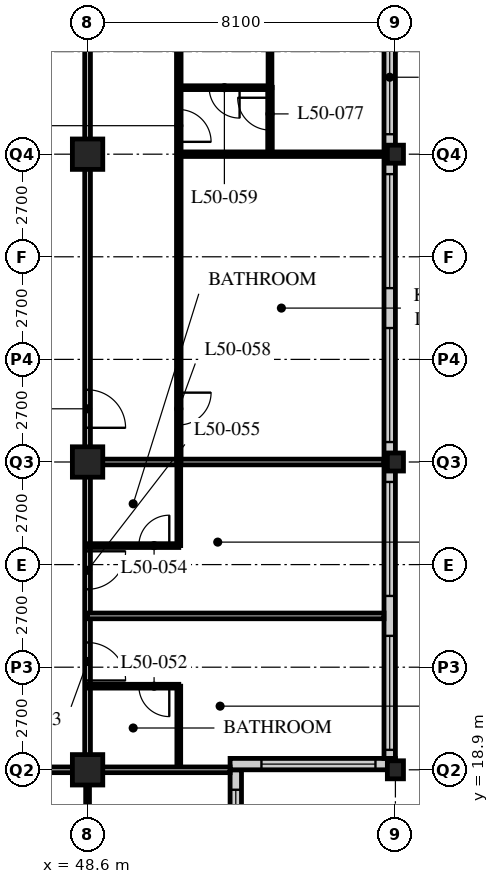
"""IFC4 building model, lengths in metres.
Left out: names, types, materials, properties, quantities, classifications, styles, units other than length and angle.
Written with IfcOpenShell. Run it as: python <this file> out.ifc"""

import sys

from ifc_helpers import new_model, si_unit, direction, frame, frame_2d, origin, origin_2d, place, context, subcontext, project, spatial, rectangle, hollow_rectangle, i_section, extrude, element, fill, save


model = new_model("IFC4")
c1 = context("Model", 3, precision=1e-05, world=origin(), true_north=direction((0.0, 1.0)))
c2 = subcontext(c1, "Body", "Model", "MODEL_VIEW")
j1 = project(units=[si_unit("LENGTHUNIT", "METRE"), si_unit("PLANEANGLEUNIT", "RADIAN")], contexts=[c1])
p1 = place(None, origin())
s1 = spatial("IfcSite", under=j1, at=p1, CompositionType="ELEMENT")
p2 = place(p1, origin())
s2 = spatial("IfcBuilding", under=s1, at=p2, CompositionType="ELEMENT")
p3 = place(p2, frame((0.0, 0.0, 195.6)))
s3 = spatial("IfcBuildingStorey", under=s2, at=p3, CompositionType="ELEMENT", Elevation=195.6)
for number, where, z_axis, x_axis in (
    (1, (48.6, 18.9, 0.0), (0.0, 0.0, 1.0), (1.0, 0.0, 0.0)),
    (2, (48.6, 27.0, 0.0), (0.0, 0.0, 1.0), (1.0, 0.0, 0.0)),
    (3, (48.6, 35.1, 0.0), (0.0, 0.0, 1.0), (1.0, 0.0, 0.0)),
):
    element("IfcColumn", number, at=place(p3, frame(where, z_axis=z_axis, x_axis=x_axis)), inside=s3, PredefinedType="COLUMN", context=c2, shape_type="SweptSolid", body=[
        extrude(hollow_rectangle(XDim=0.8, YDim=0.8, WallThickness=0.08, at=origin_2d()), origin(), (0.0, 0.0, 1.0), 3.6),
    ])
for number, where, z_axis, x_axis in (
    (4, (56.7, 18.9, 0.0), (0.0, 0.0, 1.0), (1.0, 0.0, 0.0)),
    (5, (56.7, 27.0, 0.0), (0.0, 0.0, 1.0), (1.0, 0.0, 0.0)),
    (6, (56.7, 35.1, 0.0), (0.0, 0.0, 1.0), (1.0, 0.0, 0.0)),
):
    element("IfcColumn", number, at=place(p3, frame(where, z_axis=z_axis, x_axis=x_axis)), inside=s3, PredefinedType="COLUMN", context=c2, shape_type="SweptSolid", body=[
        extrude(i_section(OverallWidth=0.424, OverallDepth=0.475, WebThickness=0.048, FlangeThickness=0.077, FilletRadius=0.015, at=origin_2d()), origin(), (0.0, 0.0, 1.0), 3.6),
    ])
p4 = place(p3, frame((52.5, 15.15, 0.0), z_axis=(0.0, 0.0, 1.0), x_axis=(0.0, 1.0, 0.0)))
e7 = element("IfcWall", 7, at=p4, inside=s3, PredefinedType="SOLIDWALL", context=c2, shape_type="SweptSolid", body=[
    extrude(rectangle(XDim=3.75, YDim=0.3, at=frame_2d((1.875, 0.0))), origin(), (0.0, 0.0, 1.0), 3.39),
])
p5 = place(p4, frame((0.225, 0.0, 0.6)))
e8 = element("IfcOpeningElement", 8, at=p5, cuts=e7, PredefinedType="OPENING", context=c2, shape_type="SweptSolid", body=[
    extrude(rectangle(XDim=3.0, YDim=2.0, at=frame_2d((1.5, 1.0))), frame((0.0, 0.16, 0.0), z_axis=(0.0, -1.0, 0.0), x_axis=(1.0, 0.0, 0.0)), (0.0, 0.0, 1.0), 0.32),
])
p6 = place(p3, frame((52.35, 19.05, 0.0), z_axis=(0.0, 0.0, 1.0), x_axis=(1.0, 0.0, 0.0)))
e9 = element("IfcWall", 9, at=p6, inside=s3, PredefinedType="SOLIDWALL", context=c2, shape_type="SweptSolid", body=[
    extrude(rectangle(XDim=4.35, YDim=0.3, at=frame_2d((2.175, 0.0))), origin(), (0.0, 0.0, 1.0), 3.39),
])
p7 = place(p6, frame((0.825, 0.0, 0.6)))
e10 = element("IfcOpeningElement", 10, at=p7, cuts=e9, PredefinedType="OPENING", context=c2, shape_type="SweptSolid", body=[
    extrude(rectangle(XDim=3.0, YDim=2.0, at=frame_2d((1.5, 1.0))), frame((0.0, 0.16, 0.0), z_axis=(0.0, -1.0, 0.0), x_axis=(1.0, 0.0, 0.0)), (0.0, 0.0, 1.0), 0.32),
])
p8 = place(p3, frame((56.55, 19.2, 0.0), z_axis=(0.0, 0.0, 1.0), x_axis=(0.0, 1.0, 0.0)))
e11 = element("IfcWall", 11, at=p8, inside=s3, PredefinedType="SOLIDWALL", context=c2, shape_type="SweptSolid", body=[
    extrude(rectangle(XDim=32.1, YDim=0.3, at=frame_2d((16.05, 0.0))), origin(), (0.0, 0.0, 1.0), 3.39),
])
p9 = place(p8, frame((0.225, 0.0, 0.6)))
e12 = element("IfcOpeningElement", 12, at=p9, cuts=e11, PredefinedType="OPENING", context=c2, shape_type="SweptSolid", body=[
    extrude(rectangle(XDim=3.0, YDim=2.4, at=frame_2d((1.5, 1.2))), frame((0.0, 0.16, 0.0), z_axis=(0.0, -1.0, 0.0), x_axis=(1.0, 0.0, 0.0)), (0.0, 0.0, 1.0), 0.32),
])
p10 = place(p8, frame((4.275, 0.0, 0.6)))
e13 = element("IfcOpeningElement", 13, at=p10, cuts=e11, PredefinedType="OPENING", context=c2, shape_type="SweptSolid", body=[
    extrude(rectangle(XDim=3.0, YDim=2.4, at=frame_2d((1.5, 1.2))), frame((0.0, 0.16, 0.0), z_axis=(0.0, -1.0, 0.0), x_axis=(1.0, 0.0, 0.0)), (0.0, 0.0, 1.0), 0.32),
])
p11 = place(p8, frame((8.325, 0.0, 0.6)))
e14 = element("IfcOpeningElement", 14, at=p11, cuts=e11, PredefinedType="OPENING", context=c2, shape_type="SweptSolid", body=[
    extrude(rectangle(XDim=3.0, YDim=2.4, at=frame_2d((1.5, 1.2))), frame((0.0, 0.16, 0.0), z_axis=(0.0, -1.0, 0.0), x_axis=(1.0, 0.0, 0.0)), (0.0, 0.0, 1.0), 0.32),
])
p12 = place(p8, frame((12.375, 0.0, 0.6)))
e15 = element("IfcOpeningElement", 15, at=p12, cuts=e11, PredefinedType="OPENING", context=c2, shape_type="SweptSolid", body=[
    extrude(rectangle(XDim=3.0, YDim=2.4, at=frame_2d((1.5, 1.2))), frame((0.0, 0.16, 0.0), z_axis=(0.0, -1.0, 0.0), x_axis=(1.0, 0.0, 0.0)), (0.0, 0.0, 1.0), 0.32),
])
p13 = place(p8, frame((16.425, 0.0, 0.6)))
e16 = element("IfcOpeningElement", 16, at=p13, cuts=e11, PredefinedType="OPENING", context=c2, shape_type="SweptSolid", body=[
    extrude(rectangle(XDim=3.0, YDim=2.4, at=frame_2d((1.5, 1.2))), frame((0.0, 0.16, 0.0), z_axis=(0.0, -1.0, 0.0), x_axis=(1.0, 0.0, 0.0)), (0.0, 0.0, 1.0), 0.32),
])
p14 = place(p8, frame((20.475, 0.0, 0.6)))
e17 = element("IfcOpeningElement", 17, at=p14, cuts=e11, PredefinedType="OPENING", context=c2, shape_type="SweptSolid", body=[
    extrude(rectangle(XDim=3.0, YDim=2.4, at=frame_2d((1.5, 1.2))), frame((0.0, 0.16, 0.0), z_axis=(0.0, -1.0, 0.0), x_axis=(1.0, 0.0, 0.0)), (0.0, 0.0, 1.0), 0.32),
])
p15 = place(p8, frame((24.525, 0.0, 0.6)))
e18 = element("IfcOpeningElement", 18, at=p15, cuts=e11, PredefinedType="OPENING", context=c2, shape_type="SweptSolid", body=[
    extrude(rectangle(XDim=3.0, YDim=2.4, at=frame_2d((1.5, 1.2))), frame((0.0, 0.16, 0.0), z_axis=(0.0, -1.0, 0.0), x_axis=(1.0, 0.0, 0.0)), (0.0, 0.0, 1.0), 0.32),
])
p16 = place(p8, frame((28.575, 0.0, 0.6)))
e19 = element("IfcOpeningElement", 19, at=p16, cuts=e11, PredefinedType="OPENING", context=c2, shape_type="SweptSolid", body=[
    extrude(rectangle(XDim=3.0, YDim=2.4, at=frame_2d((1.5, 1.2))), frame((0.0, 0.16, 0.0), z_axis=(0.0, -1.0, 0.0), x_axis=(1.0, 0.0, 0.0)), (0.0, 0.0, 1.0), 0.32),
])
p17 = place(p3, frame((8.1, 18.9, 0.0), z_axis=(0.0, 0.0, 1.0), x_axis=(1.0, 0.0, 0.0)))
e20 = element("IfcWall", 20, at=p17, inside=s3, PredefinedType="PARTITIONING", context=c2, shape_type="SweptSolid", body=[
    extrude(rectangle(XDim=40.5, YDim=0.15, at=frame_2d((20.25, 0.0))), origin(), (0.0, 0.0, 1.0), 2.778),
])
p18 = place(p17, frame((4.45, 0.0, 0.0)))
e21 = element("IfcOpeningElement", 21, at=p18, cuts=e20, PredefinedType="OPENING", context=c2, shape_type="SweptSolid", body=[
    extrude(rectangle(XDim=1.0, YDim=2.1, at=frame_2d((0.5, 1.05))), frame((0.0, 0.085, 0.0), z_axis=(0.0, -1.0, 0.0), x_axis=(1.0, 0.0, 0.0)), (0.0, 0.0, 1.0), 0.17),
])
p19 = place(p17, frame((17.1, 0.0, 0.0)))
e22 = element("IfcOpeningElement", 22, at=p19, cuts=e20, PredefinedType="OPENING", context=c2, shape_type="SweptSolid", body=[
    extrude(rectangle(XDim=1.0, YDim=2.1, at=frame_2d((0.5, 1.05))), frame((0.0, 0.085, 0.0), z_axis=(0.0, -1.0, 0.0), x_axis=(1.0, 0.0, 0.0)), (0.0, 0.0, 1.0), 0.17),
])
p20 = place(p17, frame((28.75, 0.0, 0.0)))
e23 = element("IfcOpeningElement", 23, at=p20, cuts=e20, PredefinedType="OPENING", context=c2, shape_type="SweptSolid", body=[
    extrude(rectangle(XDim=1.0, YDim=2.1, at=frame_2d((0.5, 1.05))), frame((0.0, 0.085, 0.0), z_axis=(0.0, -1.0, 0.0), x_axis=(1.0, 0.0, 0.0)), (0.0, 0.0, 1.0), 0.17),
])
p21 = place(p17, frame((2.625, 0.0, 0.0)))
e24 = element("IfcOpeningElement", 24, at=p21, cuts=e20, PredefinedType="OPENING", context=c2, shape_type="SweptSolid", body=[
    extrude(rectangle(XDim=1.0, YDim=2.1, at=frame_2d((0.5, 1.05))), frame((0.0, 0.085, 0.0), z_axis=(0.0, -1.0, 0.0), x_axis=(1.0, 0.0, 0.0)), (0.0, 0.0, 1.0), 0.17),
])
p22 = place(p17, frame((36.875, 0.0, 0.0)))
e25 = element("IfcOpeningElement", 25, at=p22, cuts=e20, PredefinedType="OPENING", context=c2, shape_type="SweptSolid", body=[
    extrude(rectangle(XDim=1.0, YDim=2.1, at=frame_2d((0.5, 1.05))), frame((0.0, 0.085, 0.0), z_axis=(0.0, -1.0, 0.0), x_axis=(1.0, 0.0, 0.0)), (0.0, 0.0, 1.0), 0.17),
])
p23 = place(p3, frame((48.6, 18.9, 0.0), z_axis=(0.0, 0.0, 1.0), x_axis=(0.0, 1.0, 0.0)))
e26 = element("IfcWall", 26, at=p23, inside=s3, PredefinedType="PARTITIONING", context=c2, shape_type="SweptSolid", body=[
    extrude(rectangle(XDim=24.3, YDim=0.15, at=frame_2d((12.15, 0.0))), origin(), (0.0, 0.0, 1.0), 2.778),
])
p24 = place(p23, frame((2.35, 0.0, 0.0)))
e27 = element("IfcOpeningElement", 27, at=p24, cuts=e26, PredefinedType="OPENING", context=c2, shape_type="SweptSolid", body=[
    extrude(rectangle(XDim=1.0, YDim=2.1, at=frame_2d((0.5, 1.05))), frame((0.0, 0.085, 0.0), z_axis=(0.0, -1.0, 0.0), x_axis=(1.0, 0.0, 0.0)), (0.0, 0.0, 1.0), 0.17),
])
p25 = place(p23, frame((4.75, 0.0, 0.0)))
e28 = element("IfcOpeningElement", 28, at=p25, cuts=e26, PredefinedType="OPENING", context=c2, shape_type="SweptSolid", body=[
    extrude(rectangle(XDim=1.0, YDim=2.1, at=frame_2d((0.5, 1.05))), frame((0.0, 0.085, 0.0), z_axis=(0.0, -1.0, 0.0), x_axis=(1.0, 0.0, 0.0)), (0.0, 0.0, 1.0), 0.17),
])
p26 = place(p23, frame((9.0, 0.0, 0.0)))
e29 = element("IfcOpeningElement", 29, at=p26, cuts=e26, PredefinedType="OPENING", context=c2, shape_type="SweptSolid", body=[
    extrude(rectangle(XDim=1.0, YDim=2.1, at=frame_2d((0.5, 1.05))), frame((0.0, 0.085, 0.0), z_axis=(0.0, -1.0, 0.0), x_axis=(1.0, 0.0, 0.0)), (0.0, 0.0, 1.0), 0.17),
])
p27 = place(p3, frame((51.0, 18.9, 0.0), z_axis=(0.0, 0.0, 1.0), x_axis=(0.0, 1.0, 0.0)))
e30 = element("IfcWall", 30, at=p27, inside=s3, PredefinedType="PARTITIONING", context=c2, shape_type="SweptSolid", body=[
    extrude(rectangle(XDim=2.2, YDim=0.1, at=frame_2d((1.1, 0.0))), origin(), (0.0, 0.0, 1.0), 3.39),
])
p28 = place(p3, frame((48.6, 21.1, 0.0), z_axis=(0.0, 0.0, 1.0), x_axis=(1.0, 0.0, 0.0)))
e31 = element("IfcWall", 31, at=p28, inside=s3, PredefinedType="PARTITIONING", context=c2, shape_type="SweptSolid", body=[
    extrude(rectangle(XDim=2.4, YDim=0.1, at=frame_2d((1.2, 0.0))), origin(), (0.0, 0.0, 1.0), 3.39),
])
p29 = place(p28, frame((1.35, 0.0, 0.0)))
e32 = element("IfcOpeningElement", 32, at=p29, cuts=e31, PredefinedType="OPENING", context=c2, shape_type="SweptSolid", body=[
    extrude(rectangle(XDim=0.8, YDim=2.1, at=frame_2d((0.4, 1.05))), frame((0.0, 0.06, 0.0), z_axis=(0.0, -1.0, 0.0), x_axis=(1.0, 0.0, 0.0)), (0.0, 0.0, 1.0), 0.12),
])
p30 = place(p3, frame((48.6, 22.95, 0.0), z_axis=(0.0, 0.0, 1.0), x_axis=(1.0, 0.0, 0.0)))
e33 = element("IfcWall", 33, at=p30, inside=s3, PredefinedType="PARTITIONING", context=c2, shape_type="SweptSolid", body=[
    extrude(rectangle(XDim=7.8, YDim=0.15, at=frame_2d((3.9, 0.0))), origin(), (0.0, 0.0, 1.0), 3.39),
])
p31 = place(p3, frame((51.0, 24.8, 0.0), z_axis=(0.0, 0.0, 1.0), x_axis=(0.0, 1.0, 0.0)))
e34 = element("IfcWall", 34, at=p31, inside=s3, PredefinedType="PARTITIONING", context=c2, shape_type="SweptSolid", body=[
    extrude(rectangle(XDim=2.2, YDim=0.1, at=frame_2d((1.1, 0.0))), origin(), (0.0, 0.0, 1.0), 3.39),
])
p32 = place(p3, frame((48.6, 24.8, 0.0), z_axis=(0.0, 0.0, 1.0), x_axis=(1.0, 0.0, 0.0)))
e35 = element("IfcWall", 35, at=p32, inside=s3, PredefinedType="PARTITIONING", context=c2, shape_type="SweptSolid", body=[
    extrude(rectangle(XDim=2.4, YDim=0.1, at=frame_2d((1.2, 0.0))), origin(), (0.0, 0.0, 1.0), 3.39),
])
p33 = place(p32, frame((1.35, 0.0, 0.0)))
e36 = element("IfcOpeningElement", 36, at=p33, cuts=e35, PredefinedType="OPENING", context=c2, shape_type="SweptSolid", body=[
    extrude(rectangle(XDim=0.8, YDim=2.1, at=frame_2d((0.4, 1.05))), frame((0.0, 0.06, 0.0), z_axis=(0.0, -1.0, 0.0), x_axis=(1.0, 0.0, 0.0)), (0.0, 0.0, 1.0), 0.12),
])
p34 = place(p3, frame((48.6, 27.0, 0.0), z_axis=(0.0, 0.0, 1.0), x_axis=(1.0, 0.0, 0.0)))
e37 = element("IfcWall", 37, at=p34, inside=s3, PredefinedType="PARTITIONING", context=c2, shape_type="SweptSolid", body=[
    extrude(rectangle(XDim=7.8, YDim=0.15, at=frame_2d((3.9, 0.0))), origin(), (0.0, 0.0, 1.0), 2.778),
])
p35 = place(p3, frame((51.0, 27.0, 0.0), z_axis=(0.0, 0.0, 1.0), x_axis=(0.0, 1.0, 0.0)))
e38 = element("IfcWall", 38, at=p35, inside=s3, PredefinedType="PARTITIONING", context=c2, shape_type="SweptSolid", body=[
    extrude(rectangle(XDim=16.2, YDim=0.12, at=frame_2d((8.1, 0.0))), origin(), (0.0, 0.0, 1.0), 3.39),
])
p36 = place(p35, frame((0.975, 0.0, 0.0)))
e39 = element("IfcOpeningElement", 39, at=p36, cuts=e38, PredefinedType="OPENING", context=c2, shape_type="SweptSolid", body=[
    extrude(rectangle(XDim=0.85, YDim=2.1, at=frame_2d((0.425, 1.05))), frame((0.0, 0.07, 0.0), z_axis=(0.0, -1.0, 0.0), x_axis=(1.0, 0.0, 0.0)), (0.0, 0.0, 1.0), 0.14),
])
p37 = place(p35, frame((8.425, 0.0, 0.0)))
e40 = element("IfcOpeningElement", 40, at=p37, cuts=e38, PredefinedType="OPENING", context=c2, shape_type="SweptSolid", body=[
    extrude(rectangle(XDim=0.85, YDim=2.1, at=frame_2d((0.425, 1.05))), frame((0.0, 0.07, 0.0), z_axis=(0.0, -1.0, 0.0), x_axis=(1.0, 0.0, 0.0)), (0.0, 0.0, 1.0), 0.14),
])
p38 = place(p35, frame((12.475, 0.0, 0.0)))
e41 = element("IfcOpeningElement", 41, at=p38, cuts=e38, PredefinedType="OPENING", context=c2, shape_type="SweptSolid", body=[
    extrude(rectangle(XDim=0.85, YDim=2.1, at=frame_2d((0.425, 1.05))), frame((0.0, 0.07, 0.0), z_axis=(0.0, -1.0, 0.0), x_axis=(1.0, 0.0, 0.0)), (0.0, 0.0, 1.0), 0.14),
])
p39 = place(p3, frame((51.0, 36.85, 0.0), z_axis=(0.0, 0.0, 1.0), x_axis=(1.0, 0.0, 0.0)))
e42 = element("IfcWall", 42, at=p39, inside=s3, PredefinedType="PARTITIONING", context=c2, shape_type="SweptSolid", body=[
    extrude(rectangle(XDim=2.4, YDim=0.1, at=frame_2d((1.2, 0.0))), origin(), (0.0, 0.0, 1.0), 3.39),
])
p40 = place(p39, frame((0.8, 0.0, 0.0)))
e43 = element("IfcOpeningElement", 43, at=p40, cuts=e42, PredefinedType="OPENING", context=c2, shape_type="SweptSolid", body=[
    extrude(rectangle(XDim=0.8, YDim=2.1, at=frame_2d((0.4, 1.05))), frame((0.0, 0.06, 0.0), z_axis=(0.0, -1.0, 0.0), x_axis=(1.0, 0.0, 0.0)), (0.0, 0.0, 1.0), 0.12),
])
p41 = place(p3, frame((53.4, 36.85, 0.0), z_axis=(0.0, 0.0, 1.0), x_axis=(0.0, 1.0, 0.0)))
e44 = element("IfcWall", 44, at=p41, inside=s3, PredefinedType="PARTITIONING", context=c2, shape_type="SweptSolid", body=[
    extrude(rectangle(XDim=2.3, YDim=0.1, at=frame_2d((1.15, 0.0))), origin(), (0.0, 0.0, 1.0), 3.39),
])
p42 = place(p3, frame((51.0, 35.1, 0.0), z_axis=(0.0, 0.0, 1.0), x_axis=(1.0, 0.0, 0.0)))
e45 = element("IfcWall", 45, at=p42, inside=s3, PredefinedType="PARTITIONING", context=c2, shape_type="SweptSolid", body=[
    extrude(rectangle(XDim=5.4, YDim=0.12, at=frame_2d((2.7, 0.0))), origin(), (0.0, 0.0, 1.0), 2.778),
])
p43 = place(p3, frame((48.6, 18.9, 0.0), z_axis=(0.0, 0.0, 1.0), x_axis=(0.0, -1.0, 0.0)))
e46 = element("IfcWall", 46, at=p43, inside=s3, PredefinedType="PARTITIONING", context=c2, shape_type="SweptSolid", body=[
    extrude(rectangle(XDim=2.4, YDim=0.1, at=frame_2d((1.2, 0.0))), origin(), (0.0, 0.0, 1.0), 2.778),
])
p44 = place(p3, frame((48.6, 18.9, 0.0), z_axis=(0.0, 0.0, 1.0), x_axis=(1.0, 0.0, 0.0)))
e47 = element("IfcWall", 47, at=p44, inside=s3, PredefinedType="PARTITIONING", context=c2, shape_type="SweptSolid", body=[
    extrude(rectangle(XDim=3.75, YDim=0.15, at=frame_2d((1.875, 0.0))), origin(), (0.0, 0.0, 1.0), 2.778),
])
p45 = place(p3, frame((53.4, 36.86, 0.0), z_axis=(0.0, 0.0, 1.0), x_axis=(0.0, -1.0, 0.0)))
e48 = element("IfcWall", 48, at=p45, inside=s3, PredefinedType="PARTITIONING", context=c2, shape_type="SweptSolid", body=[
    extrude(rectangle(XDim=1.76, YDim=0.12, at=frame_2d((0.88, 0.0))), origin(), (0.0, 0.0, 1.0), 3.39),
])
p46 = place(p45, frame((0.275, 0.0, 0.0)))
e49 = element("IfcOpeningElement", 49, at=p46, cuts=e48, PredefinedType="OPENING", context=c2, shape_type="SweptSolid", body=[
    extrude(rectangle(XDim=0.85, YDim=2.1, at=frame_2d((0.425, 1.05))), frame((0.0, 0.07, 0.0), z_axis=(0.0, -1.0, 0.0), x_axis=(1.0, 0.0, 0.0)), (0.0, 0.0, 1.0), 0.14),
])
p47 = place(p5, origin())
e50 = element("IfcWindow", 50, at=p47, inside=s3, PartitioningType="SINGLE_PANEL", PredefinedType="WINDOW", context=c2, shape_type="SweptSolid", body=[
    extrude(rectangle(XDim=3.0, YDim=2.0, at=frame_2d((1.5, 1.0))), frame((0.0, 0.03, 0.0), z_axis=(0.0, -1.0, 0.0), x_axis=(1.0, 0.0, 0.0)), (0.0, 0.0, 1.0), 0.06),
])
fill(e8, e50)
p48 = place(p7, origin())
e51 = element("IfcWindow", 51, at=p48, inside=s3, PartitioningType="SINGLE_PANEL", PredefinedType="WINDOW", context=c2, shape_type="SweptSolid", body=[
    extrude(rectangle(XDim=3.0, YDim=2.0, at=frame_2d((1.5, 1.0))), frame((0.0, 0.03, 0.0), z_axis=(0.0, -1.0, 0.0), x_axis=(1.0, 0.0, 0.0)), (0.0, 0.0, 1.0), 0.06),
])
fill(e10, e51)
p49 = place(p9, origin())
e52 = element("IfcWindow", 52, at=p49, inside=s3, PartitioningType="SINGLE_PANEL", PredefinedType="WINDOW", context=c2, shape_type="SweptSolid", body=[
    extrude(rectangle(XDim=3.0, YDim=2.4, at=frame_2d((1.5, 1.2))), frame((0.0, 0.03, 0.0), z_axis=(0.0, -1.0, 0.0), x_axis=(1.0, 0.0, 0.0)), (0.0, 0.0, 1.0), 0.06),
])
fill(e12, e52)
p50 = place(p10, origin())
e53 = element("IfcWindow", 53, at=p50, inside=s3, PartitioningType="SINGLE_PANEL", PredefinedType="WINDOW", context=c2, shape_type="SweptSolid", body=[
    extrude(rectangle(XDim=3.0, YDim=2.4, at=frame_2d((1.5, 1.2))), frame((0.0, 0.03, 0.0), z_axis=(0.0, -1.0, 0.0), x_axis=(1.0, 0.0, 0.0)), (0.0, 0.0, 1.0), 0.06),
])
fill(e13, e53)
p51 = place(p11, origin())
e54 = element("IfcWindow", 54, at=p51, inside=s3, PartitioningType="SINGLE_PANEL", PredefinedType="WINDOW", context=c2, shape_type="SweptSolid", body=[
    extrude(rectangle(XDim=3.0, YDim=2.4, at=frame_2d((1.5, 1.2))), frame((0.0, 0.03, 0.0), z_axis=(0.0, -1.0, 0.0), x_axis=(1.0, 0.0, 0.0)), (0.0, 0.0, 1.0), 0.06),
])
fill(e14, e54)
p52 = place(p12, origin())
e55 = element("IfcWindow", 55, at=p52, inside=s3, PartitioningType="SINGLE_PANEL", PredefinedType="WINDOW", context=c2, shape_type="SweptSolid", body=[
    extrude(rectangle(XDim=3.0, YDim=2.4, at=frame_2d((1.5, 1.2))), frame((0.0, 0.03, 0.0), z_axis=(0.0, -1.0, 0.0), x_axis=(1.0, 0.0, 0.0)), (0.0, 0.0, 1.0), 0.06),
])
fill(e15, e55)
p53 = place(p13, origin())
e56 = element("IfcWindow", 56, at=p53, inside=s3, PartitioningType="SINGLE_PANEL", PredefinedType="WINDOW", context=c2, shape_type="SweptSolid", body=[
    extrude(rectangle(XDim=3.0, YDim=2.4, at=frame_2d((1.5, 1.2))), frame((0.0, 0.03, 0.0), z_axis=(0.0, -1.0, 0.0), x_axis=(1.0, 0.0, 0.0)), (0.0, 0.0, 1.0), 0.06),
])
fill(e16, e56)
p54 = place(p29, origin())
e57 = element("IfcDoor", 57, at=p54, inside=s3, OperationType="SINGLE_SWING_LEFT", PredefinedType="DOOR", context=c2, shape_type="SweptSolid", body=[
    extrude(rectangle(XDim=0.8, YDim=2.1, at=frame_2d((0.4, 1.05))), frame((0.0, 0.025, 0.0), z_axis=(0.0, -1.0, 0.0), x_axis=(1.0, 0.0, 0.0)), (0.0, 0.0, 1.0), 0.05),
])
fill(e32, e57)
p55 = place(p24, origin())
e58 = element("IfcDoor", 58, at=p55, inside=s3, OperationType="SINGLE_SWING_RIGHT", PredefinedType="DOOR", context=c2, shape_type="SweptSolid", body=[
    extrude(rectangle(XDim=1.0, YDim=2.1, at=frame_2d((0.5, 1.05))), frame((0.0, 0.025, 0.0), z_axis=(0.0, -1.0, 0.0), x_axis=(1.0, 0.0, 0.0)), (0.0, 0.0, 1.0), 0.05),
])
fill(e27, e58)
p56 = place(p33, origin())
e59 = element("IfcDoor", 59, at=p56, inside=s3, OperationType="SINGLE_SWING_RIGHT", PredefinedType="DOOR", context=c2, shape_type="SweptSolid", body=[
    extrude(rectangle(XDim=0.8, YDim=2.1, at=frame_2d((0.4, 1.05))), frame((0.0, 0.025, 0.0), z_axis=(0.0, -1.0, 0.0), x_axis=(1.0, 0.0, 0.0)), (0.0, 0.0, 1.0), 0.05),
])
fill(e36, e59)
p57 = place(p25, origin())
e60 = element("IfcDoor", 60, at=p57, inside=s3, OperationType="SINGLE_SWING_LEFT", PredefinedType="DOOR", context=c2, shape_type="SweptSolid", body=[
    extrude(rectangle(XDim=1.0, YDim=2.1, at=frame_2d((0.5, 1.05))), frame((0.0, 0.025, 0.0), z_axis=(0.0, -1.0, 0.0), x_axis=(1.0, 0.0, 0.0)), (0.0, 0.0, 1.0), 0.05),
])
fill(e28, e60)
p58 = place(p26, origin())
e61 = element("IfcDoor", 61, at=p58, inside=s3, OperationType="SINGLE_SWING_RIGHT", PredefinedType="DOOR", context=c2, shape_type="SweptSolid", body=[
    extrude(rectangle(XDim=1.0, YDim=2.1, at=frame_2d((0.5, 1.05))), frame((0.0, 0.025, 0.0), z_axis=(0.0, -1.0, 0.0), x_axis=(1.0, 0.0, 0.0)), (0.0, 0.0, 1.0), 0.05),
])
fill(e29, e61)
p59 = place(p36, origin())
e62 = element("IfcDoor", 62, at=p59, inside=s3, OperationType="SINGLE_SWING_LEFT", PredefinedType="DOOR", context=c2, shape_type="SweptSolid", body=[
    extrude(rectangle(XDim=0.85, YDim=2.1, at=frame_2d((0.425, 1.05))), frame((0.0, 0.025, 0.0), z_axis=(0.0, -1.0, 0.0), x_axis=(1.0, 0.0, 0.0)), (0.0, 0.0, 1.0), 0.05),
])
fill(e39, e62)
p60 = place(p40, origin())
e63 = element("IfcDoor", 63, at=p60, inside=s3, OperationType="SINGLE_SWING_LEFT", PredefinedType="DOOR", context=c2, shape_type="SweptSolid", body=[
    extrude(rectangle(XDim=0.8, YDim=2.1, at=frame_2d((0.4, 1.05))), frame((0.0, 0.025, 0.0), z_axis=(0.0, -1.0, 0.0), x_axis=(1.0, 0.0, 0.0)), (0.0, 0.0, 1.0), 0.05),
])
fill(e43, e63)
p61 = place(p37, origin())
e64 = element("IfcDoor", 64, at=p61, inside=s3, OperationType="SINGLE_SWING_RIGHT", PredefinedType="DOOR", context=c2, shape_type="SweptSolid", body=[
    extrude(rectangle(XDim=0.85, YDim=2.1, at=frame_2d((0.425, 1.05))), frame((0.0, 0.025, 0.0), z_axis=(0.0, -1.0, 0.0), x_axis=(1.0, 0.0, 0.0)), (0.0, 0.0, 1.0), 0.05),
])
fill(e40, e64)
p62 = place(p46, origin())
e65 = element("IfcDoor", 65, at=p62, inside=s3, OperationType="SINGLE_SWING_RIGHT", PredefinedType="DOOR", context=c2, shape_type="SweptSolid", body=[
    extrude(rectangle(XDim=0.85, YDim=2.1, at=frame_2d((0.425, 1.05))), frame((0.0, 0.025, 0.0), z_axis=(0.0, -1.0, 0.0), x_axis=(1.0, 0.0, 0.0)), (0.0, 0.0, 1.0), 0.05),
])
fill(e49, e65)
save(model, sys.argv[1])
